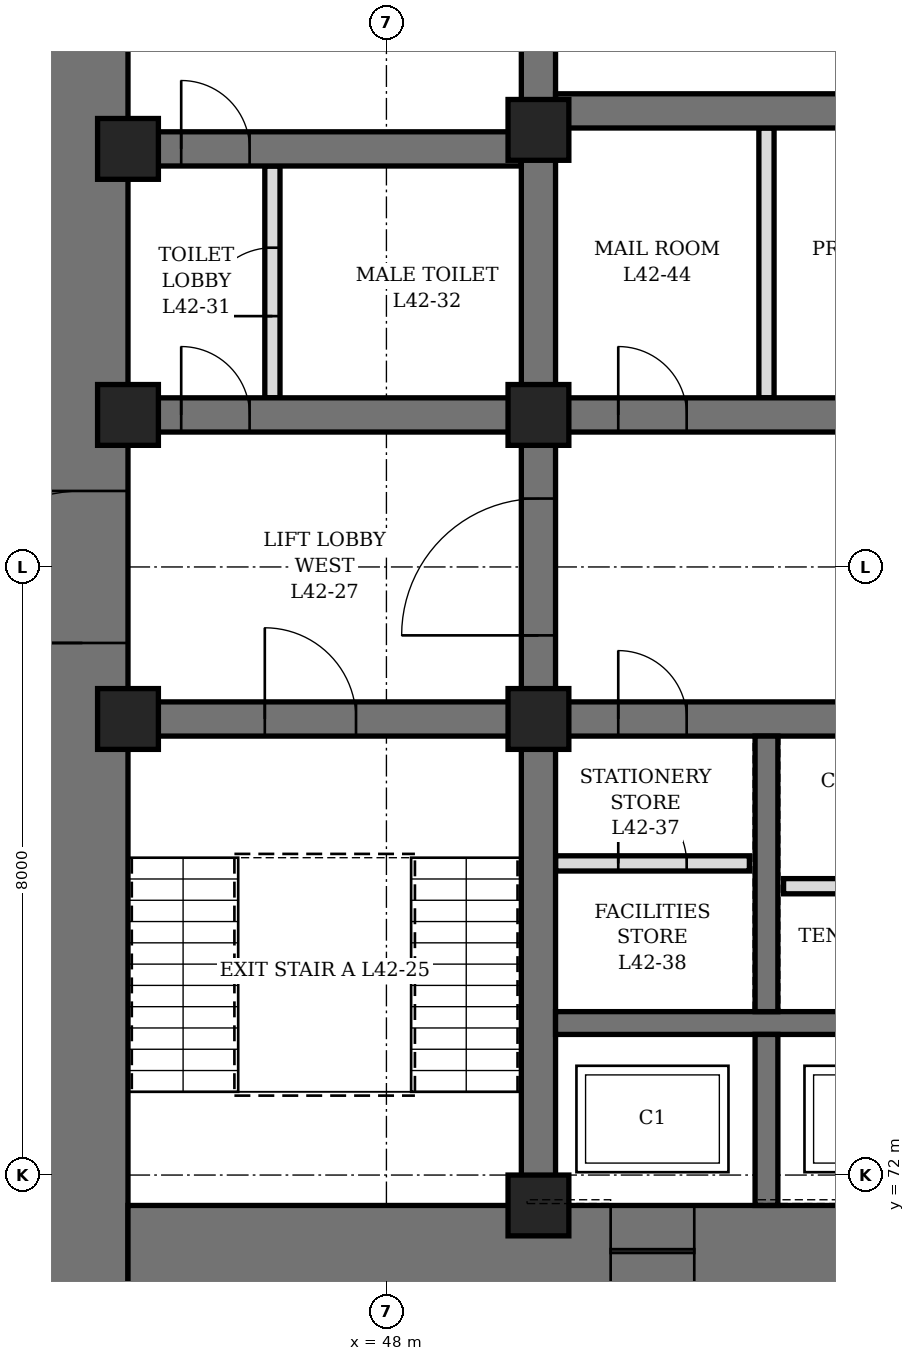
"""IFC4 building model, lengths in metres.
Left out: names, types, materials, properties, quantities, classifications, styles, units other than length and angle.
Written with IfcOpenShell. Run it as: python <this file> out.ifc"""

import sys

from ifc_helpers import new_model, si_unit, direction, frame, frame_2d, origin, origin_2d, place, context, subcontext, project, spatial, rectangle, hollow_rectangle, extrude, element, fill, save


model = new_model("IFC4")
c1 = context("Model", 3, precision=1e-05, world=origin(), true_north=direction((0.0, 1.0)))
c2 = subcontext(c1, "Body", "Model", "MODEL_VIEW")
j1 = project(units=[si_unit("LENGTHUNIT", "METRE"), si_unit("PLANEANGLEUNIT", "RADIAN")], contexts=[c1])
p1 = place(None, origin())
s1 = spatial("IfcSite", under=j1, at=p1, CompositionType="ELEMENT")
p2 = place(p1, origin())
s2 = spatial("IfcBuilding", under=s1, at=p2, CompositionType="ELEMENT")
p3 = place(p2, frame((0.0, 0.0, 189.7)))
s3 = spatial("IfcBuildingStorey", under=s2, at=p3, CompositionType="ELEMENT", Elevation=189.7)
p4 = place(p3, frame((44.0, 70.4, 0.0), z_axis=(0.0, 0.0, 1.0), x_axis=(0.0, 1.0, 0.0)))
e1 = element("IfcWall", 1, at=p4, inside=s3, PredefinedType="SHEAR", context=c2, shape_type="SweptSolid", body=[
    extrude(rectangle(XDim=19.2, YDim=1.2, at=frame_2d((9.6, 0.0))), origin(), (0.0, 0.0, 1.0), 4.2),
])
p5 = place(p4, frame((8.6, 0.0, 0.0)))
e2 = element("IfcOpeningElement", 2, at=p5, cuts=e1, PredefinedType="OPENING", context=c2, shape_type="SweptSolid", body=[
    extrude(rectangle(XDim=2.0, YDim=2.4, at=frame_2d((1.0, 1.2))), frame((0.0, 0.61, 0.0), z_axis=(0.0, -1.0, 0.0), x_axis=(1.0, 0.0, 0.0)), (0.0, 0.0, 1.0), 1.22),
])
p6 = place(p3, frame((44.6, 71.0, 0.0), z_axis=(0.0, 0.0, 1.0), x_axis=(1.0, 0.0, 0.0)))
e3 = element("IfcWall", 3, at=p6, inside=s3, PredefinedType="SHEAR", context=c2, shape_type="SweptSolid", body=[
    extrude(rectangle(XDim=22.8, YDim=1.2, at=frame_2d((11.4, 0.0))), origin(), (0.0, 0.0, 1.0), 4.2),
])
p7 = place(p6, frame((6.35, 0.0, 0.0)))
e4 = element("IfcOpeningElement", 4, at=p7, cuts=e3, PredefinedType="OPENING", context=c2, shape_type="SweptSolid", body=[
    extrude(rectangle(XDim=1.1, YDim=2.2, at=frame_2d((0.55, 1.1))), frame((0.0, 0.61, 0.0), z_axis=(0.0, -1.0, 0.0), x_axis=(1.0, 0.0, 0.0)), (0.0, 0.0, 1.0), 1.22),
])
p8 = place(p6, frame((9.35, 0.0, 0.0)))
e5 = element("IfcOpeningElement", 5, at=p8, cuts=e3, PredefinedType="OPENING", context=c2, shape_type="SweptSolid", body=[
    extrude(rectangle(XDim=1.1, YDim=2.2, at=frame_2d((0.55, 1.1))), frame((0.0, 0.61, 0.0), z_axis=(0.0, -1.0, 0.0), x_axis=(1.0, 0.0, 0.0)), (0.0, 0.0, 1.0), 1.22),
])
p9 = place(p6, frame((12.35, 0.0, 0.0)))
e6 = element("IfcOpeningElement", 6, at=p9, cuts=e3, PredefinedType="OPENING", context=c2, shape_type="SweptSolid", body=[
    extrude(rectangle(XDim=1.1, YDim=2.2, at=frame_2d((0.55, 1.1))), frame((0.0, 0.61, 0.0), z_axis=(0.0, -1.0, 0.0), x_axis=(1.0, 0.0, 0.0)), (0.0, 0.0, 1.0), 1.22),
])
p10 = place(p6, frame((15.35, 0.0, 0.0)))
e7 = element("IfcOpeningElement", 7, at=p10, cuts=e3, PredefinedType="OPENING", context=c2, shape_type="SweptSolid", body=[
    extrude(rectangle(XDim=1.1, YDim=2.2, at=frame_2d((0.55, 1.1))), frame((0.0, 0.61, 0.0), z_axis=(0.0, -1.0, 0.0), x_axis=(1.0, 0.0, 0.0)), (0.0, 0.0, 1.0), 1.22),
])
p11 = place(p3, frame((50.0, 71.6, 0.0), z_axis=(0.0, 0.0, 1.0), x_axis=(0.0, 1.0, 0.0)))
e8 = element("IfcWall", 8, at=p11, inside=s3, PredefinedType="SHEAR", context=c2, shape_type="SweptSolid", body=[
    extrude(rectangle(XDim=16.8, YDim=0.45, at=frame_2d((8.4, 0.0))), origin(), (0.0, 0.0, 1.0), 4.2),
])
p12 = place(p11, frame((7.5, 0.0, 0.0)))
e9 = element("IfcOpeningElement", 9, at=p12, cuts=e8, PredefinedType="OPENING", context=c2, shape_type="SweptSolid", body=[
    extrude(rectangle(XDim=1.8, YDim=2.4, at=frame_2d((0.9, 1.2))), frame((0.0, 0.235, 0.0), z_axis=(0.0, -1.0, 0.0), x_axis=(1.0, 0.0, 0.0)), (0.0, 0.0, 1.0), 0.47),
])
p13 = place(p3, frame((44.6, 78.0, 0.0), z_axis=(0.0, 0.0, 1.0), x_axis=(1.0, 0.0, 0.0)))
e10 = element("IfcWall", 10, at=p13, inside=s3, PredefinedType="SHEAR", context=c2, shape_type="SweptSolid", body=[
    extrude(rectangle(XDim=5.175, YDim=0.45, at=frame_2d((2.587, 0.0))), origin(), (0.0, 0.0, 1.0), 4.2),
])
p14 = place(p13, frame((1.8, 0.0, 0.0)))
e11 = element("IfcOpeningElement", 11, at=p14, cuts=e10, PredefinedType="OPENING", context=c2, shape_type="SweptSolid", body=[
    extrude(rectangle(XDim=1.2, YDim=2.1, at=frame_2d((0.6, 1.05))), frame((0.0, 0.235, 0.0), z_axis=(0.0, -1.0, 0.0), x_axis=(1.0, 0.0, 0.0)), (0.0, 0.0, 1.0), 0.47),
])
p15 = place(p3, frame((44.6, 82.0, 0.0), z_axis=(0.0, 0.0, 1.0), x_axis=(1.0, 0.0, 0.0)))
e12 = element("IfcWall", 12, at=p15, inside=s3, PredefinedType="SHEAR", context=c2, shape_type="SweptSolid", body=[
    extrude(rectangle(XDim=5.175, YDim=0.45, at=frame_2d((2.587, 0.0))), origin(), (0.0, 0.0, 1.0), 4.2),
])
p16 = place(p15, frame((0.7, 0.0, 0.0)))
e13 = element("IfcOpeningElement", 13, at=p16, cuts=e12, PredefinedType="OPENING", context=c2, shape_type="SweptSolid", body=[
    extrude(rectangle(XDim=0.9, YDim=2.1, at=frame_2d((0.45, 1.05))), frame((0.0, 0.235, 0.0), z_axis=(0.0, -1.0, 0.0), x_axis=(1.0, 0.0, 0.0)), (0.0, 0.0, 1.0), 0.47),
])
p17 = place(p3, frame((44.6, 85.5, 0.0), z_axis=(0.0, 0.0, 1.0), x_axis=(1.0, 0.0, 0.0)))
e14 = element("IfcWall", 14, at=p17, inside=s3, PredefinedType="SHEAR", context=c2, shape_type="SweptSolid", body=[
    extrude(rectangle(XDim=5.175, YDim=0.45, at=frame_2d((2.587, 0.0))), origin(), (0.0, 0.0, 1.0), 4.2),
])
p18 = place(p17, frame((0.7, 0.0, 0.0)))
e15 = element("IfcOpeningElement", 15, at=p18, cuts=e14, PredefinedType="OPENING", context=c2, shape_type="SweptSolid", body=[
    extrude(rectangle(XDim=0.9, YDim=2.1, at=frame_2d((0.45, 1.05))), frame((0.0, 0.235, 0.0), z_axis=(0.0, -1.0, 0.0), x_axis=(1.0, 0.0, 0.0)), (0.0, 0.0, 1.0), 0.47),
])
p19 = place(p3, frame((50.225, 78.0, 0.0), z_axis=(0.0, 0.0, 1.0), x_axis=(1.0, 0.0, 0.0)))
e16 = element("IfcWall", 16, at=p19, inside=s3, PredefinedType="SHEAR", context=c2, shape_type="SweptSolid", body=[
    extrude(rectangle(XDim=11.55, YDim=0.45, at=frame_2d((5.775, 0.0))), origin(), (0.0, 0.0, 1.0), 4.2),
])
p20 = place(p19, frame((0.825, 0.0, 0.0)))
e17 = element("IfcOpeningElement", 17, at=p20, cuts=e16, PredefinedType="OPENING", context=c2, shape_type="SweptSolid", body=[
    extrude(rectangle(XDim=0.9, YDim=2.1, at=frame_2d((0.45, 1.05))), frame((0.0, 0.235, 0.0), z_axis=(0.0, -1.0, 0.0), x_axis=(1.0, 0.0, 0.0)), (0.0, 0.0, 1.0), 0.47),
])
p21 = place(p19, frame((3.825, 0.0, 0.0)))
e18 = element("IfcOpeningElement", 18, at=p21, cuts=e16, PredefinedType="OPENING", context=c2, shape_type="SweptSolid", body=[
    extrude(rectangle(XDim=0.9, YDim=2.1, at=frame_2d((0.45, 1.05))), frame((0.0, 0.235, 0.0), z_axis=(0.0, -1.0, 0.0), x_axis=(1.0, 0.0, 0.0)), (0.0, 0.0, 1.0), 0.47),
])
p22 = place(p19, frame((6.825, 0.0, 0.0)))
e19 = element("IfcOpeningElement", 19, at=p22, cuts=e16, PredefinedType="OPENING", context=c2, shape_type="SweptSolid", body=[
    extrude(rectangle(XDim=0.9, YDim=2.1, at=frame_2d((0.45, 1.05))), frame((0.0, 0.235, 0.0), z_axis=(0.0, -1.0, 0.0), x_axis=(1.0, 0.0, 0.0)), (0.0, 0.0, 1.0), 0.47),
])
p23 = place(p19, frame((9.825, 0.0, 0.0)))
e20 = element("IfcOpeningElement", 20, at=p23, cuts=e16, PredefinedType="OPENING", context=c2, shape_type="SweptSolid", body=[
    extrude(rectangle(XDim=0.9, YDim=2.1, at=frame_2d((0.45, 1.05))), frame((0.0, 0.235, 0.0), z_axis=(0.0, -1.0, 0.0), x_axis=(1.0, 0.0, 0.0)), (0.0, 0.0, 1.0), 0.47),
])
p24 = place(p3, frame((50.225, 82.0, 0.0), z_axis=(0.0, 0.0, 1.0), x_axis=(1.0, 0.0, 0.0)))
e21 = element("IfcWall", 21, at=p24, inside=s3, PredefinedType="SHEAR", context=c2, shape_type="SweptSolid", body=[
    extrude(rectangle(XDim=11.55, YDim=0.45, at=frame_2d((5.775, 0.0))), origin(), (0.0, 0.0, 1.0), 4.2),
])
p25 = place(p24, frame((0.825, 0.0, 0.0)))
e22 = element("IfcOpeningElement", 22, at=p25, cuts=e21, PredefinedType="OPENING", context=c2, shape_type="SweptSolid", body=[
    extrude(rectangle(XDim=0.9, YDim=2.1, at=frame_2d((0.45, 1.05))), frame((0.0, 0.235, 0.0), z_axis=(0.0, -1.0, 0.0), x_axis=(1.0, 0.0, 0.0)), (0.0, 0.0, 1.0), 0.47),
])
p26 = place(p24, frame((3.825, 0.0, 0.0)))
e23 = element("IfcOpeningElement", 23, at=p26, cuts=e21, PredefinedType="OPENING", context=c2, shape_type="SweptSolid", body=[
    extrude(rectangle(XDim=0.9, YDim=2.1, at=frame_2d((0.45, 1.05))), frame((0.0, 0.235, 0.0), z_axis=(0.0, -1.0, 0.0), x_axis=(1.0, 0.0, 0.0)), (0.0, 0.0, 1.0), 0.47),
])
p27 = place(p24, frame((6.825, 0.0, 0.0)))
e24 = element("IfcOpeningElement", 24, at=p27, cuts=e21, PredefinedType="OPENING", context=c2, shape_type="SweptSolid", body=[
    extrude(rectangle(XDim=0.9, YDim=2.1, at=frame_2d((0.45, 1.05))), frame((0.0, 0.235, 0.0), z_axis=(0.0, -1.0, 0.0), x_axis=(1.0, 0.0, 0.0)), (0.0, 0.0, 1.0), 0.47),
])
p28 = place(p24, frame((9.825, 0.0, 0.0)))
e25 = element("IfcOpeningElement", 25, at=p28, cuts=e21, PredefinedType="OPENING", context=c2, shape_type="SweptSolid", body=[
    extrude(rectangle(XDim=0.9, YDim=2.1, at=frame_2d((0.45, 1.05))), frame((0.0, 0.235, 0.0), z_axis=(0.0, -1.0, 0.0), x_axis=(1.0, 0.0, 0.0)), (0.0, 0.0, 1.0), 0.47),
])
p29 = place(p3, frame((50.225, 86.0, 0.0), z_axis=(0.0, 0.0, 1.0), x_axis=(1.0, 0.0, 0.0)))
e26 = element("IfcWall", 26, at=p29, inside=s3, PredefinedType="SHEAR", context=c2, shape_type="SweptSolid", body=[
    extrude(rectangle(XDim=11.55, YDim=0.45, at=frame_2d((5.775, 0.0))), origin(), (0.0, 0.0, 1.0), 4.2),
])
p30 = place(p3, frame((50.225, 74.0, 0.0), z_axis=(0.0, 0.0, 1.0), x_axis=(1.0, 0.0, 0.0)))
e27 = element("IfcWall", 27, at=p30, inside=s3, PredefinedType="SHEAR", context=c2, shape_type="SweptSolid", body=[
    extrude(rectangle(XDim=11.55, YDim=0.3, at=frame_2d((5.775, 0.0))), origin(), (0.0, 0.0, 1.0), 4.2),
])
p31 = place(p3, frame((53.0, 71.6, 0.0), z_axis=(0.0, 0.0, 1.0), x_axis=(0.0, 1.0, 0.0)))
e28 = element("IfcWall", 28, at=p31, inside=s3, PredefinedType="SHEAR", context=c2, shape_type="SweptSolid", body=[
    extrude(rectangle(XDim=2.25, YDim=0.3, at=frame_2d((1.125, 0.0))), origin(), (0.0, 0.0, 1.0), 4.2),
])
p32 = place(p3, frame((53.0, 74.15, 0.0), z_axis=(0.0, 0.0, 1.0), x_axis=(0.0, 1.0, 0.0)))
e29 = element("IfcWall", 29, at=p32, inside=s3, PredefinedType="SHEAR", context=c2, shape_type="SweptSolid", body=[
    extrude(rectangle(XDim=3.625, YDim=0.3, at=frame_2d((1.812, 0.0))), origin(), (0.0, 0.0, 1.0), 4.2),
])
for number, where, z_axis, x_axis in (
    (30, (44.6, 78.0, 0.0), (0.0, 0.0, 1.0), (1.0, 0.0, 0.0)),
    (31, (44.6, 82.0, 0.0), (0.0, 0.0, 1.0), (1.0, 0.0, 0.0)),
    (32, (44.6, 85.5, 0.0), (0.0, 0.0, 1.0), (1.0, 0.0, 0.0)),
    (33, (50.0, 71.6, 0.0), (0.0, 0.0, 1.0), (1.0, 0.0, 0.0)),
    (34, (50.0, 78.0, 0.0), (0.0, 0.0, 1.0), (1.0, 0.0, 0.0)),
    (35, (50.0, 82.0, 0.0), (0.0, 0.0, 1.0), (1.0, 0.0, 0.0)),
    (36, (50.0, 85.75, 0.0), (0.0, 0.0, 1.0), (1.0, 0.0, 0.0)),
):
    element("IfcColumn", number, at=place(p3, frame(where, z_axis=z_axis, x_axis=x_axis)), inside=s3, PredefinedType="COLUMN", context=c2, shape_type="SweptSolid", body=[
        extrude(hollow_rectangle(XDim=0.8, YDim=0.8, WallThickness=0.1, at=origin_2d()), origin(), (0.0, 0.0, 1.0), 4.2),
    ])
p33 = place(p3, frame((46.5, 82.225, 0.0), z_axis=(0.0, 0.0, 1.0), x_axis=(0.0, 1.0, 0.0)))
e37 = element("IfcWall", 37, at=p33, inside=s3, PredefinedType="PARTITIONING", context=c2, shape_type="SweptSolid", body=[
    extrude(rectangle(XDim=3.05, YDim=0.2, at=frame_2d((1.525, 0.0))), origin(), (0.0, 0.0, 1.0), 4.04),
])
p34 = place(p33, frame((1.075, 0.0, 0.0)))
e38 = element("IfcOpeningElement", 38, at=p34, cuts=e37, PredefinedType="OPENING", context=c2, shape_type="SweptSolid", body=[
    extrude(rectangle(XDim=0.9, YDim=2.1, at=frame_2d((0.45, 1.05))), frame((0.0, 0.11, 0.0), z_axis=(0.0, -1.0, 0.0), x_axis=(1.0, 0.0, 0.0)), (0.0, 0.0, 1.0), 0.22),
])
p35 = place(p3, frame((50.225, 76.1, 0.0), z_axis=(0.0, 0.0, 1.0), x_axis=(1.0, 0.0, 0.0)))
e39 = element("IfcWall", 39, at=p35, inside=s3, PredefinedType="PARTITIONING", context=c2, shape_type="SweptSolid", body=[
    extrude(rectangle(XDim=2.55, YDim=0.2, at=frame_2d((1.275, 0.0))), origin(), (0.0, 0.0, 1.0), 4.04),
])
p36 = place(p35, frame((0.825, 0.0, 0.0)))
e40 = element("IfcOpeningElement", 40, at=p36, cuts=e39, PredefinedType="OPENING", context=c2, shape_type="SweptSolid", body=[
    extrude(rectangle(XDim=0.9, YDim=2.1, at=frame_2d((0.45, 1.05))), frame((0.0, 0.11, 0.0), z_axis=(0.0, -1.0, 0.0), x_axis=(1.0, 0.0, 0.0)), (0.0, 0.0, 1.0), 0.22),
])
p37 = place(p3, frame((53.225, 75.8, 0.0), z_axis=(0.0, 0.0, 1.0), x_axis=(1.0, 0.0, 0.0)))
e41 = element("IfcWall", 41, at=p37, inside=s3, PredefinedType="PARTITIONING", context=c2, shape_type="SweptSolid", body=[
    extrude(rectangle(XDim=2.55, YDim=0.2, at=frame_2d((1.275, 0.0))), origin(), (0.0, 0.0, 1.0), 4.04),
])
p38 = place(p37, frame((0.825, 0.0, 0.0)))
e42 = element("IfcOpeningElement", 42, at=p38, cuts=e41, PredefinedType="OPENING", context=c2, shape_type="SweptSolid", body=[
    extrude(rectangle(XDim=0.9, YDim=2.1, at=frame_2d((0.45, 1.05))), frame((0.0, 0.11, 0.0), z_axis=(0.0, -1.0, 0.0), x_axis=(1.0, 0.0, 0.0)), (0.0, 0.0, 1.0), 0.22),
])
p39 = place(p3, frame((53.0, 82.225, 0.0), z_axis=(0.0, 0.0, 1.0), x_axis=(0.0, 1.0, 0.0)))
e43 = element("IfcWall", 43, at=p39, inside=s3, PredefinedType="PARTITIONING", context=c2, shape_type="SweptSolid", body=[
    extrude(rectangle(XDim=3.55, YDim=0.2, at=frame_2d((1.775, 0.0))), origin(), (0.0, 0.0, 1.0), 4.04),
])
p40 = place(p16, origin())
e44 = element("IfcDoor", 44, at=p40, inside=s3, OperationType="SINGLE_SWING_LEFT", PredefinedType="DOOR", context=c2, shape_type="SweptSolid", body=[
    extrude(rectangle(XDim=0.9, YDim=2.1, at=frame_2d((0.45, 1.05))), frame((0.0, 0.225, 0.0), z_axis=(0.0, -1.0, 0.0), x_axis=(1.0, 0.0, 0.0)), (0.0, 0.0, 1.0), 0.449),
])
fill(e13, e44)
p41 = place(p34, origin())
e45 = element("IfcDoor", 45, at=p41, inside=s3, OperationType="SINGLE_SWING_RIGHT", PredefinedType="DOOR", context=c2, shape_type="SweptSolid", body=[
    extrude(rectangle(XDim=0.9, YDim=2.1, at=frame_2d((0.45, 1.05))), frame((0.0, 0.1, 0.0), z_axis=(0.0, -1.0, 0.0), x_axis=(1.0, 0.0, 0.0)), (0.0, 0.0, 1.0), 0.199),
])
fill(e38, e45)
p42 = place(p18, origin())
e46 = element("IfcDoor", 46, at=p42, inside=s3, OperationType="SINGLE_SWING_RIGHT", PredefinedType="DOOR", context=c2, shape_type="SweptSolid", body=[
    extrude(rectangle(XDim=0.9, YDim=2.1, at=frame_2d((0.45, 1.05))), frame((0.0, 0.225, 0.0), z_axis=(0.0, -1.0, 0.0), x_axis=(1.0, 0.0, 0.0)), (0.0, 0.0, 1.0), 0.449),
])
fill(e15, e46)
p43 = place(p20, origin())
e47 = element("IfcDoor", 47, at=p43, inside=s3, OperationType="SINGLE_SWING_LEFT", PredefinedType="DOOR", context=c2, shape_type="SweptSolid", body=[
    extrude(rectangle(XDim=0.9, YDim=2.1, at=frame_2d((0.45, 1.05))), frame((0.0, 0.225, 0.0), z_axis=(0.0, -1.0, 0.0), x_axis=(1.0, 0.0, 0.0)), (0.0, 0.0, 1.0), 0.449),
])
fill(e17, e47)
p44 = place(p36, origin())
e48 = element("IfcDoor", 48, at=p44, inside=s3, OperationType="SINGLE_SWING_LEFT", PredefinedType="DOOR", context=c2, shape_type="SweptSolid", body=[
    extrude(rectangle(XDim=0.9, YDim=2.1, at=frame_2d((0.45, 1.05))), frame((0.0, 0.1, 0.0), z_axis=(0.0, -1.0, 0.0), x_axis=(1.0, 0.0, 0.0)), (0.0, 0.0, 1.0), 0.199),
])
fill(e40, e48)
p45 = place(p25, origin())
e49 = element("IfcDoor", 49, at=p45, inside=s3, OperationType="SINGLE_SWING_LEFT", PredefinedType="DOOR", context=c2, shape_type="SweptSolid", body=[
    extrude(rectangle(XDim=0.9, YDim=2.1, at=frame_2d((0.45, 1.05))), frame((0.0, 0.225, 0.0), z_axis=(0.0, -1.0, 0.0), x_axis=(1.0, 0.0, 0.0)), (0.0, 0.0, 1.0), 0.449),
])
fill(e22, e49)
p46 = place(p14, origin())
e50 = element("IfcDoor", 50, at=p46, inside=s3, OperationType="SINGLE_SWING_LEFT", PredefinedType="DOOR", context=c2, shape_type="SweptSolid", body=[
    extrude(rectangle(XDim=1.2, YDim=2.1, at=frame_2d((0.6, 1.05))), frame((0.0, 0.225, 0.0), z_axis=(0.0, -1.0, 0.0), x_axis=(1.0, 0.0, 0.0)), (0.0, 0.0, 1.0), 0.449),
])
fill(e11, e50)
p47 = place(p5, origin())
e51 = element("IfcDoor", 51, at=p47, inside=s3, OperationType="DOUBLE_DOOR_SINGLE_SWING", PredefinedType="DOOR", context=c2, shape_type="SweptSolid", body=[
    extrude(rectangle(XDim=2.0, YDim=2.4, at=frame_2d((1.0, 1.2))), frame((0.0, 0.35, 0.0), z_axis=(0.0, -1.0, 0.0), x_axis=(1.0, 0.0, 0.0)), (0.0, 0.0, 1.0), 0.7),
])
fill(e2, e51)
p48 = place(p12, origin())
e52 = element("IfcDoor", 52, at=p48, inside=s3, OperationType="DOUBLE_DOOR_SINGLE_SWING", PredefinedType="DOOR", context=c2, shape_type="SweptSolid", body=[
    extrude(rectangle(XDim=1.8, YDim=2.4, at=frame_2d((0.9, 1.2))), frame((0.0, 0.225, 0.0), z_axis=(0.0, -1.0, 0.0), x_axis=(1.0, 0.0, 0.0)), (0.0, 0.0, 1.0), 0.449),
])
fill(e9, e52)
p49 = place(p7, origin())
e53 = element("IfcDoor", 53, at=p49, inside=s3, OperationType="SLIDING_TO_LEFT", PredefinedType="DOOR", context=c2, shape_type="SweptSolid", body=[
    extrude(rectangle(XDim=1.1, YDim=2.2, at=frame_2d((0.55, 1.1))), frame((0.0, 0.35, 0.0), z_axis=(0.0, -1.0, 0.0), x_axis=(1.0, 0.0, 0.0)), (0.0, 0.0, 1.0), 0.7),
])
fill(e4, e53)
save(model, sys.argv[1])
